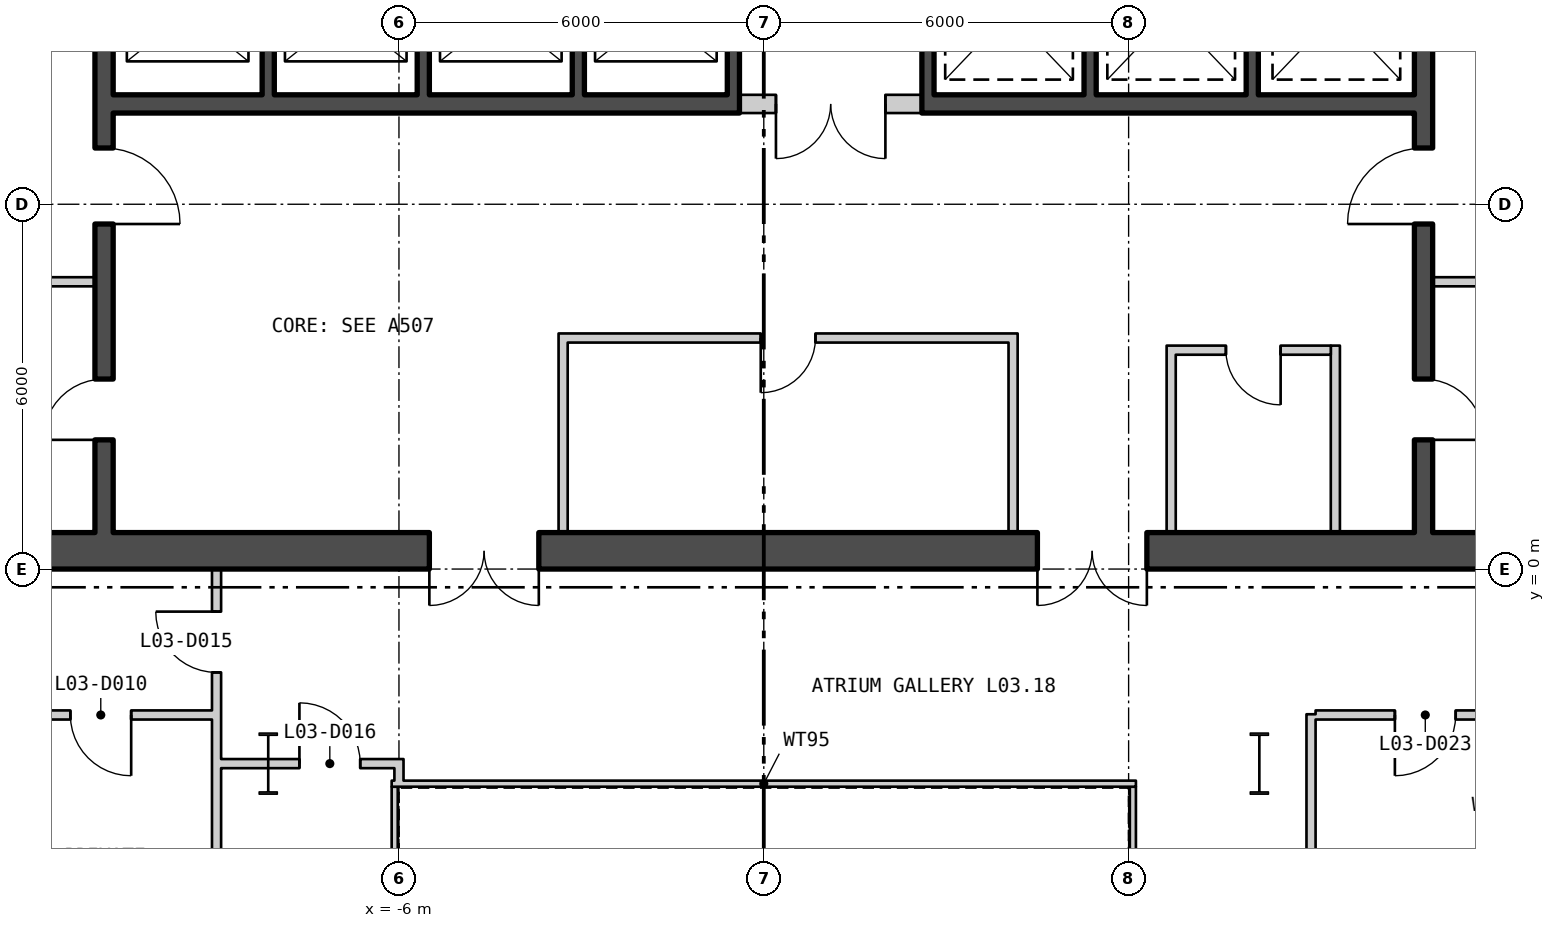
"""IFC4 building model, lengths in metres.
Left out: names, types, materials, properties, quantities, classifications, styles, units other than length and angle.
Written with IfcOpenShell. Run it as: python <this file> out.ifc"""

import sys

from ifc_helpers import new_model, si_unit, direction, frame, frame_2d, origin, origin_2d, place, context, subcontext, project, spatial, rectangle, i_section, extrude, element, fill, save


model = new_model("IFC4")
c1 = context("Model", 3, precision=1e-05, world=origin(), true_north=direction((0.0, 1.0)))
c2 = subcontext(c1, "Body", "Model", "MODEL_VIEW")
j1 = project(units=[si_unit("LENGTHUNIT", "METRE"), si_unit("PLANEANGLEUNIT", "RADIAN")], contexts=[c1])
p1 = place(None, origin())
s1 = spatial("IfcSite", under=j1, at=p1, CompositionType="ELEMENT")
p2 = place(p1, origin())
s2 = spatial("IfcBuilding", under=s1, at=p2, CompositionType="ELEMENT")
p3 = place(p2, frame((0.0, 0.0, 18.6)))
s3 = spatial("IfcBuildingStorey", under=s2, at=p3, CompositionType="ELEMENT", Elevation=18.6)
for number, where, z_axis, x_axis in (
    (1, (8.15, -3.2, 0.0), (0.0, 0.0, 1.0), (1.0, 0.0, 0.0)),
    (2, (-8.15, -3.2, 0.0), (0.0, 0.0, 1.0), (1.0, 0.0, 0.0)),
):
    element("IfcColumn", number, at=place(p3, frame(where, z_axis=z_axis, x_axis=x_axis)), inside=s3, PredefinedType="COLUMN", context=c2, shape_type="SweptSolid", body=[
        extrude(i_section(OverallWidth=0.302, OverallDepth=1.008, WebThickness=0.021, FlangeThickness=0.04, at=origin_2d()), origin(), (0.0, 0.0, 1.0), 5.1),
    ])
p4 = place(p3, frame((6.07, -11.62, 0.0), z_axis=(0.0, 0.0, 1.0), x_axis=(0.0, 1.0, 0.0)))
e3 = element("IfcWall", 3, at=p4, inside=s3, PredefinedType="PARTITIONING", context=c2, shape_type="SweptSolid", body=[
    extrude(rectangle(XDim=8.04, YDim=0.1, at=frame_2d((4.02, 0.0))), origin(), (0.0, 0.0, 1.0), 4.88),
])
p5 = place(p3, frame((6.12, -3.53, 0.0), z_axis=(0.0, 0.0, 1.0), x_axis=(-1.0, 0.0, 0.0)))
e4 = element("IfcWall", 4, at=p5, inside=s3, PredefinedType="PARTITIONING", context=c2, shape_type="SweptSolid", body=[
    extrude(rectangle(XDim=12.24, YDim=0.1, at=frame_2d((6.12, 0.0))), origin(), (0.0, 0.0, 1.0), 4.88),
])
p6 = place(p3, frame((-6.07, -3.58, 0.0), z_axis=(0.0, 0.0, 1.0), x_axis=(0.0, -1.0, 0.0)))
e5 = element("IfcWall", 5, at=p6, inside=s3, PredefinedType="PARTITIONING", context=c2, shape_type="SweptSolid", body=[
    extrude(rectangle(XDim=8.04, YDim=0.1, at=frame_2d((4.02, 0.0))), origin(), (0.0, 0.0, 1.0), 4.88),
])
p7 = place(p3, frame((-17.5, 0.3, 0.0), z_axis=(0.0, 0.0, 1.0), x_axis=(1.0, 0.0, 0.0)))
e6 = element("IfcWall", 6, at=p7, inside=s3, PredefinedType="SHEAR", context=c2, shape_type="SweptSolid", body=[
    extrude(rectangle(XDim=35.0, YDim=0.6, at=frame_2d((17.5, 0.0))), origin(), (0.0, 0.0, 1.0), 4.88),
])
p8 = place(p7, frame((12.0, 0.0, 0.0)))
e7 = element("IfcOpeningElement", 7, at=p8, cuts=e6, PredefinedType="OPENING", context=c2, shape_type="SweptSolid", body=[
    extrude(rectangle(XDim=1.8, YDim=2.4, at=frame_2d((0.9, 1.2))), frame((0.0, 0.31, 0.0), z_axis=(0.0, -1.0, 0.0), x_axis=(1.0, 0.0, 0.0)), (0.0, 0.0, 1.0), 0.62),
])
p9 = place(p7, frame((22.0, 0.0, 0.0)))
e8 = element("IfcOpeningElement", 8, at=p9, cuts=e6, PredefinedType="OPENING", context=c2, shape_type="SweptSolid", body=[
    extrude(rectangle(XDim=1.8, YDim=2.4, at=frame_2d((0.9, 1.2))), frame((0.0, 0.31, 0.0), z_axis=(0.0, -1.0, 0.0), x_axis=(1.0, 0.0, 0.0)), (0.0, 0.0, 1.0), 0.62),
])
p10 = place(p3, frame((-10.85, 0.6, 0.0), z_axis=(0.0, 0.0, 1.0), x_axis=(0.0, 1.0, 0.0)))
e9 = element("IfcWall", 9, at=p10, inside=s3, PredefinedType="SHEAR", context=c2, shape_type="SweptSolid", body=[
    extrude(rectangle(XDim=16.8, YDim=0.3, at=frame_2d((8.4, 0.0))), origin(), (0.0, 0.0, 1.0), 4.88),
])
p11 = place(p10, frame((5.075, 0.0, 0.0)))
e10 = element("IfcOpeningElement", 10, at=p11, cuts=e9, PredefinedType="OPENING", context=c2, shape_type="SweptSolid", body=[
    extrude(rectangle(XDim=1.25, YDim=2.1, at=frame_2d((0.625, 1.05))), frame((0.0, 0.16, 0.0), z_axis=(0.0, -1.0, 0.0), x_axis=(1.0, 0.0, 0.0)), (0.0, 0.0, 1.0), 0.32),
])
p12 = place(p10, frame((1.525, 0.0, 0.0)))
e11 = element("IfcOpeningElement", 11, at=p12, cuts=e9, PredefinedType="OPENING", context=c2, shape_type="SweptSolid", body=[
    extrude(rectangle(XDim=1.0, YDim=2.1, at=frame_2d((0.5, 1.05))), frame((0.0, 0.16, 0.0), z_axis=(0.0, -1.0, 0.0), x_axis=(1.0, 0.0, 0.0)), (0.0, 0.0, 1.0), 0.32),
])
p13 = place(p3, frame((10.85, 0.6, 0.0), z_axis=(0.0, 0.0, 1.0), x_axis=(0.0, 1.0, 0.0)))
e12 = element("IfcWall", 12, at=p13, inside=s3, PredefinedType="SHEAR", context=c2, shape_type="SweptSolid", body=[
    extrude(rectangle(XDim=16.8, YDim=0.3, at=frame_2d((8.4, 0.0))), origin(), (0.0, 0.0, 1.0), 4.88),
])
p14 = place(p13, frame((5.075, 0.0, 0.0)))
e13 = element("IfcOpeningElement", 13, at=p14, cuts=e12, PredefinedType="OPENING", context=c2, shape_type="SweptSolid", body=[
    extrude(rectangle(XDim=1.25, YDim=2.1, at=frame_2d((0.625, 1.05))), frame((0.0, 0.16, 0.0), z_axis=(0.0, -1.0, 0.0), x_axis=(1.0, 0.0, 0.0)), (0.0, 0.0, 1.0), 0.32),
])
p15 = place(p13, frame((1.525, 0.0, 0.0)))
e14 = element("IfcOpeningElement", 14, at=p15, cuts=e12, PredefinedType="OPENING", context=c2, shape_type="SweptSolid", body=[
    extrude(rectangle(XDim=1.0, YDim=2.1, at=frame_2d((0.5, 1.05))), frame((0.0, 0.16, 0.0), z_axis=(0.0, -1.0, 0.0), x_axis=(1.0, 0.0, 0.0)), (0.0, 0.0, 1.0), 0.32),
])
p16 = place(p3, frame((-10.7, 7.65, 0.0), z_axis=(0.0, 0.0, 1.0), x_axis=(1.0, 0.0, 0.0)))
e15 = element("IfcWall", 15, at=p16, inside=s3, PredefinedType="SHEAR", context=c2, shape_type="SweptSolid", body=[
    extrude(rectangle(XDim=10.3, YDim=0.3, at=frame_2d((5.15, 0.0))), origin(), (0.0, 0.0, 1.0), 4.88),
])
p17 = place(p3, frame((2.6, 7.65, 0.0), z_axis=(0.0, 0.0, 1.0), x_axis=(1.0, 0.0, 0.0)))
e16 = element("IfcWall", 16, at=p17, inside=s3, PredefinedType="SHEAR", context=c2, shape_type="SweptSolid", body=[
    extrude(rectangle(XDim=8.1, YDim=0.3, at=frame_2d((4.05, 0.0))), origin(), (0.0, 0.0, 1.0), 4.88),
])
for number, where, z_axis, x_axis in (
    (17, (-8.15, 7.8, 0.0), (0.0, 0.0, 1.0), (0.0, 1.0, 0.0)),
    (18, (-5.6, 7.8, 0.0), (0.0, 0.0, 1.0), (0.0, 1.0, 0.0)),
    (19, (-3.05, 7.8, 0.0), (0.0, 0.0, 1.0), (0.0, 1.0, 0.0)),
    (20, (-0.5, 7.8, 0.0), (0.0, 0.0, 1.0), (0.0, 1.0, 0.0)),
    (21, (2.7, 7.8, 0.0), (0.0, 0.0, 1.0), (0.0, 1.0, 0.0)),
    (22, (5.367, 7.8, 0.0), (0.0, 0.0, 1.0), (0.0, 1.0, 0.0)),
    (23, (8.033, 7.8, 0.0), (0.0, 0.0, 1.0), (0.0, 1.0, 0.0)),
):
    element("IfcWall", number, at=place(p3, frame(where, z_axis=z_axis, x_axis=x_axis)), inside=s3, PredefinedType="SHEAR", context=c2, shape_type="SweptSolid", body=[
        extrude(rectangle(XDim=2.7, YDim=0.2, at=frame_2d((1.35, 0.0))), origin(), (0.0, 0.0, 1.0), 4.88),
    ])
for number, where, z_axis, x_axis in (
    (24, (-14.2, 4.725, 0.0), (0.0, 0.0, 1.0), (1.0, 0.0, 0.0)),
    (25, (11.0, 4.725, 0.0), (0.0, 0.0, 1.0), (1.0, 0.0, 0.0)),
):
    element("IfcWall", number, at=place(p3, frame(where, z_axis=z_axis, x_axis=x_axis)), inside=s3, PredefinedType="PARTITIONING", context=c2, shape_type="SweptSolid", body=[
        extrude(rectangle(XDim=3.2, YDim=0.15, at=frame_2d((1.6, 0.0))), origin(), (0.0, 0.0, 1.0), 4.88),
    ])
for number, where, z_axis, x_axis in (
    (26, (-3.3, 0.6, 0.0), (0.0, 0.0, 1.0), (0.0, 1.0, 0.0)),
    (27, (4.1, 0.6, 0.0), (0.0, 0.0, 1.0), (0.0, 1.0, 0.0)),
):
    element("IfcWall", number, at=place(p3, frame(where, z_axis=z_axis, x_axis=x_axis)), inside=s3, PredefinedType="PARTITIONING", context=c2, shape_type="SweptSolid", body=[
        extrude(rectangle(XDim=3.275, YDim=0.15, at=frame_2d((1.637, 0.0))), origin(), (0.0, 0.0, 1.0), 4.88),
    ])
p18 = place(p3, frame((-3.225, 3.8, 0.0), z_axis=(0.0, 0.0, 1.0), x_axis=(1.0, 0.0, 0.0)))
e28 = element("IfcWall", 28, at=p18, inside=s3, PredefinedType="PARTITIONING", context=c2, shape_type="SweptSolid", body=[
    extrude(rectangle(XDim=7.25, YDim=0.15, at=frame_2d((3.625, 0.0))), origin(), (0.0, 0.0, 1.0), 4.88),
])
p19 = place(p18, frame((3.175, 0.0, 0.0)))
e29 = element("IfcOpeningElement", 29, at=p19, cuts=e28, PredefinedType="OPENING", context=c2, shape_type="SweptSolid", body=[
    extrude(rectangle(XDim=0.9, YDim=2.1, at=frame_2d((0.45, 1.05))), frame((0.0, 0.085, 0.0), z_axis=(0.0, -1.0, 0.0), x_axis=(1.0, 0.0, 0.0)), (0.0, 0.0, 1.0), 0.17),
])
for number, where, z_axis, x_axis in (
    (30, (6.7, 0.6, 0.0), (0.0, 0.0, 1.0), (0.0, 1.0, 0.0)),
    (31, (9.4, 0.6, 0.0), (0.0, 0.0, 1.0), (0.0, 1.0, 0.0)),
):
    element("IfcWall", number, at=place(p3, frame(where, z_axis=z_axis, x_axis=x_axis)), inside=s3, PredefinedType="PARTITIONING", context=c2, shape_type="SweptSolid", body=[
        extrude(rectangle(XDim=3.075, YDim=0.15, at=frame_2d((1.538, 0.0))), origin(), (0.0, 0.0, 1.0), 4.88),
    ])
p20 = place(p3, frame((6.775, 3.6, 0.0), z_axis=(0.0, 0.0, 1.0), x_axis=(1.0, 0.0, 0.0)))
e32 = element("IfcWall", 32, at=p20, inside=s3, PredefinedType="PARTITIONING", context=c2, shape_type="SweptSolid", body=[
    extrude(rectangle(XDim=2.55, YDim=0.15, at=frame_2d((1.275, 0.0))), origin(), (0.0, 0.0, 1.0), 4.88),
])
p21 = place(p20, frame((0.825, 0.0, 0.0)))
e33 = element("IfcOpeningElement", 33, at=p21, cuts=e32, PredefinedType="OPENING", context=c2, shape_type="SweptSolid", body=[
    extrude(rectangle(XDim=0.9, YDim=2.1, at=frame_2d((0.45, 1.05))), frame((0.0, 0.085, 0.0), z_axis=(0.0, -1.0, 0.0), x_axis=(1.0, 0.0, 0.0)), (0.0, 0.0, 1.0), 0.17),
])
p22 = place(p3, frame((-0.4, 7.65, 0.0), z_axis=(0.0, 0.0, 1.0), x_axis=(1.0, 0.0, 0.0)))
e34 = element("IfcWall", 34, at=p22, inside=s3, PredefinedType="PARTITIONING", context=c2, shape_type="SweptSolid", body=[
    extrude(rectangle(XDim=3.0, YDim=0.3, at=frame_2d((1.5, 0.0))), origin(), (0.0, 0.0, 1.0), 4.88),
])
p23 = place(p22, frame((0.6, 0.0, 0.0)))
e35 = element("IfcOpeningElement", 35, at=p23, cuts=e34, PredefinedType="OPENING", context=c2, shape_type="SweptSolid", body=[
    extrude(rectangle(XDim=1.8, YDim=2.4, at=frame_2d((0.9, 1.2))), frame((0.0, 0.16, 0.0), z_axis=(0.0, -1.0, 0.0), x_axis=(1.0, 0.0, 0.0)), (0.0, 0.0, 1.0), 0.32),
])
p24 = place(p3, frame((-17.025, -2.4, 0.0), z_axis=(0.0, 0.0, 1.0), x_axis=(1.0, 0.0, 0.0)))
e36 = element("IfcWall", 36, at=p24, inside=s3, PredefinedType="PARTITIONING", context=c2, shape_type="SweptSolid", body=[
    extrude(rectangle(XDim=7.95, YDim=0.15, at=frame_2d((3.975, 0.0))), origin(), (0.0, 0.0, 1.0), 4.88),
])
p25 = place(p24, frame((5.621, 0.0, 0.0)))
e37 = element("IfcOpeningElement", 37, at=p25, cuts=e36, PredefinedType="OPENING", context=c2, shape_type="SweptSolid", body=[
    extrude(rectangle(XDim=1.0, YDim=2.1, at=frame_2d((0.5, 1.05))), frame((0.0, 0.085, 0.0), z_axis=(0.0, -1.0, 0.0), x_axis=(1.0, 0.0, 0.0)), (0.0, 0.0, 1.0), 0.17),
])
p26 = place(p3, frame((-9.0, -13.675, 0.0), z_axis=(0.0, 0.0, 1.0), x_axis=(0.0, 1.0, 0.0)))
e38 = element("IfcWall", 38, at=p26, inside=s3, PredefinedType="PARTITIONING", context=c2, shape_type="SweptSolid", body=[
    extrude(rectangle(XDim=13.675, YDim=0.15, at=frame_2d((6.838, 0.0))), origin(), (0.0, 0.0, 1.0), 4.88),
])
p27 = place(p26, frame((2.821, 0.0, 0.0)))
e39 = element("IfcOpeningElement", 39, at=p27, cuts=e38, PredefinedType="OPENING", context=c2, shape_type="SweptSolid", body=[
    extrude(rectangle(XDim=1.0, YDim=2.1, at=frame_2d((0.5, 1.05))), frame((0.0, 0.085, 0.0), z_axis=(0.0, -1.0, 0.0), x_axis=(1.0, 0.0, 0.0)), (0.0, 0.0, 1.0), 0.17),
])
p28 = place(p26, frame((11.975, 0.0, 0.0)))
e40 = element("IfcOpeningElement", 40, at=p28, cuts=e38, PredefinedType="OPENING", context=c2, shape_type="SweptSolid", body=[
    extrude(rectangle(XDim=1.0, YDim=2.1, at=frame_2d((0.5, 1.05))), frame((0.0, 0.085, 0.0), z_axis=(0.0, -1.0, 0.0), x_axis=(1.0, 0.0, 0.0)), (0.0, 0.0, 1.0), 0.17),
])
p29 = place(p3, frame((-8.925, -3.2, 0.0), z_axis=(0.0, 0.0, 1.0), x_axis=(1.0, 0.0, 0.0)))
e41 = element("IfcWall", 41, at=p29, inside=s3, PredefinedType="PARTITIONING", context=c2, shape_type="SweptSolid", body=[
    extrude(rectangle(XDim=0.775, YDim=0.15, at=frame_2d((0.388, 0.0))), origin(), (0.0, 0.0, 1.0), 4.09),
])
p30 = place(p3, frame((-8.15, -3.2, 0.0), z_axis=(0.0, 0.0, 1.0), x_axis=(1.0, 0.0, 0.0)))
e42 = element("IfcWall", 42, at=p30, inside=s3, PredefinedType="PARTITIONING", context=c2, shape_type="SweptSolid", body=[
    extrude(rectangle(XDim=2.225, YDim=0.15, at=frame_2d((1.113, 0.0))), origin(), (0.0, 0.0, 1.0), 3.97),
])
p31 = place(p30, frame((0.513, 0.0, 0.0)))
e43 = element("IfcOpeningElement", 43, at=p31, cuts=e42, PredefinedType="OPENING", context=c2, shape_type="SweptSolid", body=[
    extrude(rectangle(XDim=1.0, YDim=2.1, at=frame_2d((0.5, 1.05))), frame((0.0, 0.085, 0.0), z_axis=(0.0, -1.0, 0.0), x_axis=(1.0, 0.0, 0.0)), (0.0, 0.0, 1.0), 0.17),
])
p32 = place(p3, frame((-6.0, -3.48, 0.0), z_axis=(0.0, 0.0, 1.0), x_axis=(0.0, 1.0, 0.0)))
e44 = element("IfcWall", 44, at=p32, inside=s3, PredefinedType="PARTITIONING", context=c2, shape_type="SweptSolid", body=[
    extrude(rectangle(XDim=0.205, YDim=0.15, at=frame_2d((0.102, 0.0))), origin(), (0.0, 0.0, 1.0), 4.88),
])
p33 = place(p3, frame((9.0, -13.675, 0.0), z_axis=(0.0, 0.0, 1.0), x_axis=(0.0, 1.0, 0.0)))
e45 = element("IfcWall", 45, at=p33, inside=s3, PredefinedType="PARTITIONING", context=c2, shape_type="SweptSolid", body=[
    extrude(rectangle(XDim=11.287, YDim=0.15, at=frame_2d((5.644, 0.0))), origin(), (0.0, 0.0, 1.0), 4.88),
])
p34 = place(p33, frame((2.821, 0.0, 0.0)))
e46 = element("IfcOpeningElement", 46, at=p34, cuts=e45, PredefinedType="OPENING", context=c2, shape_type="SweptSolid", body=[
    extrude(rectangle(XDim=1.0, YDim=2.1, at=frame_2d((0.5, 1.05))), frame((0.0, 0.085, 0.0), z_axis=(0.0, -1.0, 0.0), x_axis=(1.0, 0.0, 0.0)), (0.0, 0.0, 1.0), 0.17),
])
p35 = place(p3, frame((9.075, -2.4, 0.0), z_axis=(0.0, 0.0, 1.0), x_axis=(1.0, 0.0, 0.0)))
e47 = element("IfcWall", 47, at=p35, inside=s3, PredefinedType="PARTITIONING", context=c2, shape_type="SweptSolid", body=[
    extrude(rectangle(XDim=7.95, YDim=0.15, at=frame_2d((3.975, 0.0))), origin(), (0.0, 0.0, 1.0), 4.88),
])
p36 = place(p35, frame((1.304, 0.0, 0.0)))
e48 = element("IfcOpeningElement", 48, at=p36, cuts=e47, PredefinedType="OPENING", context=c2, shape_type="SweptSolid", body=[
    extrude(rectangle(XDim=1.0, YDim=2.1, at=frame_2d((0.5, 1.05))), frame((0.0, 0.085, 0.0), z_axis=(0.0, -1.0, 0.0), x_axis=(1.0, 0.0, 0.0)), (0.0, 0.0, 1.0), 0.17),
])
p37 = place(p35, frame((5.304, 0.0, 0.0)))
e49 = element("IfcOpeningElement", 49, at=p37, cuts=e47, PredefinedType="OPENING", context=c2, shape_type="SweptSolid", body=[
    extrude(rectangle(XDim=1.0, YDim=2.1, at=frame_2d((0.5, 1.05))), frame((0.0, 0.085, 0.0), z_axis=(0.0, -1.0, 0.0), x_axis=(1.0, 0.0, 0.0)), (0.0, 0.0, 1.0), 0.17),
])
p38 = place(p11, origin())
e50 = element("IfcDoor", 50, at=p38, inside=s3, OperationType="SINGLE_SWING_LEFT", PredefinedType="DOOR", context=c2, shape_type="SweptSolid", body=[
    extrude(rectangle(XDim=1.25, YDim=2.1, at=frame_2d((0.625, 1.05))), frame((0.0, 0.025, 0.0), z_axis=(0.0, -1.0, 0.0), x_axis=(1.0, 0.0, 0.0)), (0.0, 0.0, 1.0), 0.05),
])
fill(e10, e50)
p39 = place(p12, origin())
e51 = element("IfcDoor", 51, at=p39, inside=s3, OperationType="SINGLE_SWING_RIGHT", PredefinedType="DOOR", context=c2, shape_type="SweptSolid", body=[
    extrude(rectangle(XDim=1.0, YDim=2.1, at=frame_2d((0.5, 1.05))), frame((0.0, 0.025, 0.0), z_axis=(0.0, -1.0, 0.0), x_axis=(1.0, 0.0, 0.0)), (0.0, 0.0, 1.0), 0.05),
])
fill(e11, e51)
p40 = place(p14, origin())
e52 = element("IfcDoor", 52, at=p40, inside=s3, OperationType="SINGLE_SWING_RIGHT", PredefinedType="DOOR", context=c2, shape_type="SweptSolid", body=[
    extrude(rectangle(XDim=1.25, YDim=2.1, at=frame_2d((0.625, 1.05))), frame((0.0, 0.025, 0.0), z_axis=(0.0, -1.0, 0.0), x_axis=(1.0, 0.0, 0.0)), (0.0, 0.0, 1.0), 0.05),
])
fill(e13, e52)
p41 = place(p15, origin())
e53 = element("IfcDoor", 53, at=p41, inside=s3, OperationType="SINGLE_SWING_LEFT", PredefinedType="DOOR", context=c2, shape_type="SweptSolid", body=[
    extrude(rectangle(XDim=1.0, YDim=2.1, at=frame_2d((0.5, 1.05))), frame((0.0, 0.025, 0.0), z_axis=(0.0, -1.0, 0.0), x_axis=(1.0, 0.0, 0.0)), (0.0, 0.0, 1.0), 0.05),
])
fill(e14, e53)
p42 = place(p19, origin())
e54 = element("IfcDoor", 54, at=p42, inside=s3, OperationType="SINGLE_SWING_LEFT", PredefinedType="DOOR", context=c2, shape_type="SweptSolid", body=[
    extrude(rectangle(XDim=0.9, YDim=2.1, at=frame_2d((0.45, 1.05))), frame((0.0, 0.025, 0.0), z_axis=(0.0, -1.0, 0.0), x_axis=(1.0, 0.0, 0.0)), (0.0, 0.0, 1.0), 0.05),
])
fill(e29, e54)
p43 = place(p21, origin())
e55 = element("IfcDoor", 55, at=p43, inside=s3, OperationType="SINGLE_SWING_RIGHT", PredefinedType="DOOR", context=c2, shape_type="SweptSolid", body=[
    extrude(rectangle(XDim=0.9, YDim=2.1, at=frame_2d((0.45, 1.05))), frame((0.0, 0.025, 0.0), z_axis=(0.0, -1.0, 0.0), x_axis=(1.0, 0.0, 0.0)), (0.0, 0.0, 1.0), 0.05),
])
fill(e33, e55)
p44 = place(p23, origin())
e56 = element("IfcDoor", 56, at=p44, inside=s3, OperationType="DOUBLE_DOOR_SINGLE_SWING", PredefinedType="DOOR", context=c2, shape_type="SweptSolid", body=[
    extrude(rectangle(XDim=1.8, YDim=2.4, at=frame_2d((0.9, 1.2))), frame((0.0, 0.025, 0.0), z_axis=(0.0, -1.0, 0.0), x_axis=(1.0, 0.0, 0.0)), (0.0, 0.0, 1.0), 0.05),
])
fill(e35, e56)
p45 = place(p8, origin())
e57 = element("IfcDoor", 57, at=p45, inside=s3, OperationType="DOUBLE_DOOR_SINGLE_SWING", PredefinedType="DOOR", context=c2, shape_type="SweptSolid", body=[
    extrude(rectangle(XDim=1.8, YDim=2.4, at=frame_2d((0.9, 1.2))), frame((0.0, 0.025, 0.0), z_axis=(0.0, -1.0, 0.0), x_axis=(1.0, 0.0, 0.0)), (0.0, 0.0, 1.0), 0.05),
])
fill(e7, e57)
p46 = place(p9, origin())
e58 = element("IfcDoor", 58, at=p46, inside=s3, OperationType="DOUBLE_DOOR_SINGLE_SWING", PredefinedType="DOOR", context=c2, shape_type="SweptSolid", body=[
    extrude(rectangle(XDim=1.8, YDim=2.4, at=frame_2d((0.9, 1.2))), frame((0.0, 0.025, 0.0), z_axis=(0.0, -1.0, 0.0), x_axis=(1.0, 0.0, 0.0)), (0.0, 0.0, 1.0), 0.05),
])
fill(e8, e58)
p47 = place(p25, origin())
e59 = element("IfcDoor", 59, at=p47, inside=s3, OperationType="SINGLE_SWING_RIGHT", PredefinedType="DOOR", context=c2, shape_type="SweptSolid", body=[
    extrude(rectangle(XDim=1.0, YDim=2.1, at=frame_2d((0.5, 1.05))), frame((0.0, 0.025, 0.0), z_axis=(0.0, -1.0, 0.0), x_axis=(1.0, 0.0, 0.0)), (0.0, 0.0, 1.0), 0.05),
])
fill(e37, e59)
p48 = place(p28, origin())
e60 = element("IfcDoor", 60, at=p48, inside=s3, OperationType="SINGLE_SWING_LEFT", PredefinedType="DOOR", context=c2, shape_type="SweptSolid", body=[
    extrude(rectangle(XDim=1.0, YDim=2.1, at=frame_2d((0.5, 1.05))), frame((0.0, 0.025, 0.0), z_axis=(0.0, -1.0, 0.0), x_axis=(1.0, 0.0, 0.0)), (0.0, 0.0, 1.0), 0.05),
])
fill(e40, e60)
p49 = place(p31, origin())
e61 = element("IfcDoor", 61, at=p49, inside=s3, OperationType="SINGLE_SWING_RIGHT", PredefinedType="DOOR", context=c2, shape_type="SweptSolid", body=[
    extrude(rectangle(XDim=1.0, YDim=2.1, at=frame_2d((0.5, 1.05))), frame((0.0, 0.025, 0.0), z_axis=(0.0, -1.0, 0.0), x_axis=(1.0, 0.0, 0.0)), (0.0, 0.0, 1.0), 0.05),
])
fill(e43, e61)
p50 = place(p36, origin())
e62 = element("IfcDoor", 62, at=p50, inside=s3, OperationType="SINGLE_SWING_LEFT", PredefinedType="DOOR", context=c2, shape_type="SweptSolid", body=[
    extrude(rectangle(XDim=1.0, YDim=2.1, at=frame_2d((0.5, 1.05))), frame((0.0, 0.025, 0.0), z_axis=(0.0, -1.0, 0.0), x_axis=(1.0, 0.0, 0.0)), (0.0, 0.0, 1.0), 0.05),
])
fill(e48, e62)
save(model, sys.argv[1])
